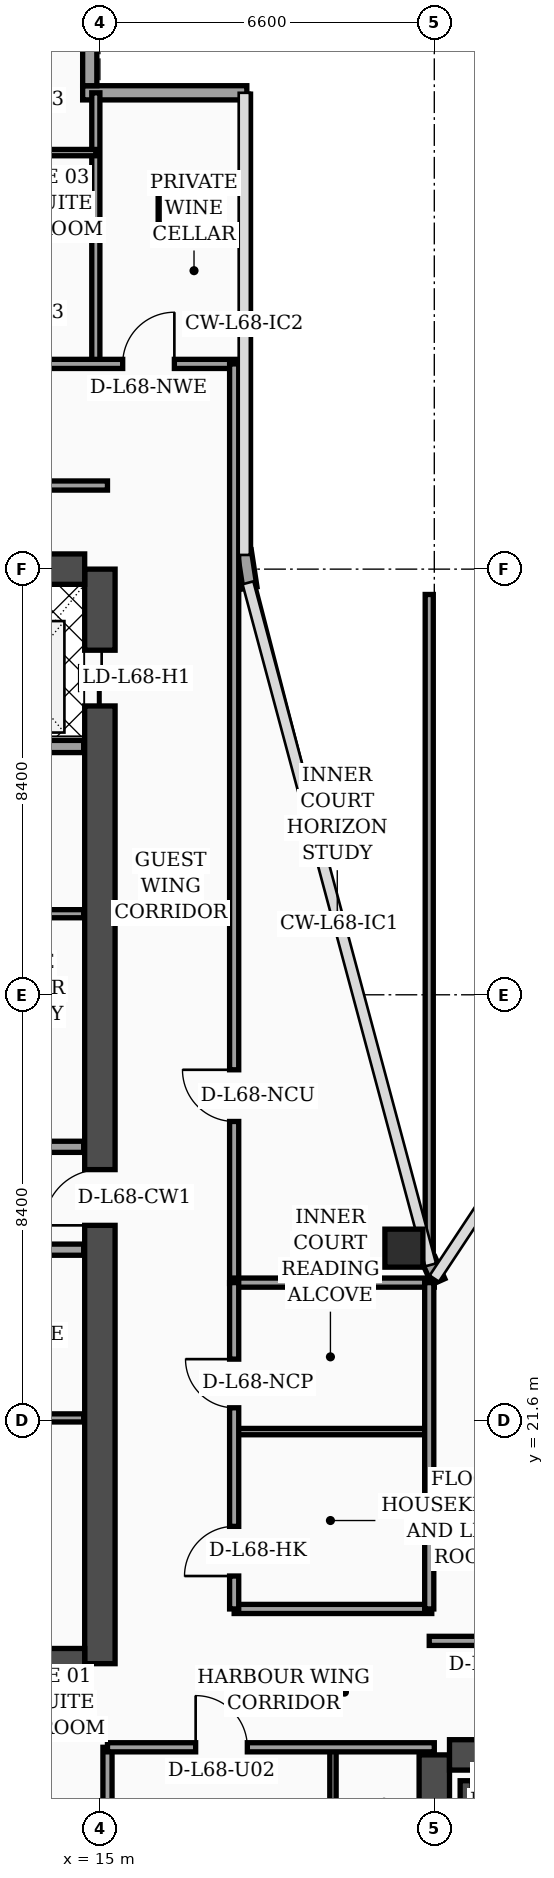
"""IFC4 building model, lengths in metres.
Left out: names, types, materials, properties, quantities, classifications, styles, units other than length and angle.
Written with IfcOpenShell. Run it as: python <this file> out.ifc"""

import sys

from ifc_helpers import new_model, si_unit, direction, frame, frame_2d, origin, origin_2d, place, context, subcontext, project, spatial, rectangle, hollow_rectangle, extrude, element, fill, save


model = new_model("IFC4")
c1 = context("Model", 3, precision=1e-05, world=origin(), true_north=direction((0.0, 1.0)))
c2 = subcontext(c1, "Body", "Model", "MODEL_VIEW")
j1 = project(units=[si_unit("LENGTHUNIT", "METRE"), si_unit("PLANEANGLEUNIT", "RADIAN")], contexts=[c1])
p1 = place(None, origin())
s1 = spatial("IfcSite", under=j1, at=p1, CompositionType="ELEMENT")
p2 = place(p1, origin())
s2 = spatial("IfcBuilding", under=s1, at=p2, CompositionType="ELEMENT")
p3 = place(p2, frame((0.0, 0.0, 274.9)))
s3 = spatial("IfcBuildingStorey", under=s2, at=p3, CompositionType="ELEMENT", Elevation=274.9)
p4 = place(p3, frame((15.0, 16.8, 0.0), z_axis=(0.0, 0.0, 1.0), x_axis=(0.0, 1.0, 0.0)))
e1 = element("IfcWall", 1, at=p4, inside=s3, PredefinedType="SHEAR", context=c2, shape_type="SweptSolid", body=[
    extrude(rectangle(XDim=21.6, YDim=0.6, at=frame_2d((10.8, 0.0))), origin(), (0.0, 0.0, 1.0), 3.56),
])
p5 = place(p4, frame((8.65, 0.0, 0.0)))
e2 = element("IfcOpeningElement", 2, at=p5, cuts=e1, PredefinedType="OPENING", context=c2, shape_type="SweptSolid", body=[
    extrude(rectangle(XDim=1.1, YDim=2.2, at=frame_2d((0.55, 1.1))), frame((0.0, 0.31, 0.0), z_axis=(0.0, -1.0, 0.0), x_axis=(1.0, 0.0, 0.0)), (0.0, 0.0, 1.0), 0.62),
])
p6 = place(p4, frame((18.9, 0.0, 0.0)))
e3 = element("IfcOpeningElement", 3, at=p6, cuts=e1, PredefinedType="OPENING", context=c2, shape_type="SweptSolid", body=[
    extrude(rectangle(XDim=1.1, YDim=2.2, at=frame_2d((0.55, 1.1))), frame((0.0, 0.31, 0.0), z_axis=(0.0, -1.0, 0.0), x_axis=(1.0, 0.0, 0.0)), (0.0, 0.0, 1.0), 0.62),
])
p7 = place(p3, frame((4.5, 38.4, 0.0), z_axis=(0.0, 0.0, 1.0), x_axis=(1.0, 0.0, 0.0)))
e4 = element("IfcWall", 4, at=p7, inside=s3, PredefinedType="SHEAR", context=c2, shape_type="SweptSolid", body=[
    extrude(rectangle(XDim=10.2, YDim=0.6, at=frame_2d((5.1, 0.0))), origin(), (0.0, 0.0, 1.0), 3.56),
])
p8 = place(p7, frame((5.8, 0.0, 0.0)))
e5 = element("IfcOpeningElement", 5, at=p8, cuts=e4, PredefinedType="OPENING", context=c2, shape_type="SweptSolid", body=[
    extrude(rectangle(XDim=1.1, YDim=2.2, at=frame_2d((0.55, 1.1))), frame((0.0, 0.31, 0.0), z_axis=(0.0, -1.0, 0.0), x_axis=(1.0, 0.0, 0.0)), (0.0, 0.0, 1.0), 0.62),
])
p9 = place(p3, frame((4.5, 16.8, 0.0), z_axis=(0.0, 0.0, 1.0), x_axis=(1.0, 0.0, 0.0)))
e6 = element("IfcWall", 6, at=p9, inside=s3, PredefinedType="SHEAR", context=c2, shape_type="SweptSolid", body=[
    extrude(rectangle(XDim=10.2, YDim=0.6, at=frame_2d((5.1, 0.0))), origin(), (0.0, 0.0, 1.0), 3.56),
])
p10 = place(p3, frame((21.6, 4.6, 0.0), z_axis=(0.0, 0.0, 1.0), x_axis=(0.0, 1.0, 0.0)))
e7 = element("IfcWall", 7, at=p10, inside=s3, PredefinedType="SHEAR", context=c2, shape_type="SweptSolid", body=[
    extrude(rectangle(XDim=10.4, YDim=0.6, at=frame_2d((5.2, 0.0))), origin(), (0.0, 0.0, 1.0), 3.56),
])
p11 = place(p3, frame((21.9, 15.0, 0.0), z_axis=(0.0, 0.0, 1.0), x_axis=(1.0, 0.0, 0.0)))
e8 = element("IfcWall", 8, at=p11, inside=s3, PredefinedType="SHEAR", context=c2, shape_type="SweptSolid", body=[
    extrude(rectangle(XDim=10.2, YDim=0.6, at=frame_2d((5.1, 0.0))), origin(), (0.0, 0.0, 1.0), 3.56),
])
p12 = place(p11, frame((5.0, 0.0, 0.0)))
e9 = element("IfcOpeningElement", 9, at=p12, cuts=e8, PredefinedType="OPENING", context=c2, shape_type="SweptSolid", body=[
    extrude(rectangle(XDim=1.1, YDim=2.2, at=frame_2d((0.55, 1.1))), frame((0.0, 0.31, 0.0), z_axis=(0.0, -1.0, 0.0), x_axis=(1.0, 0.0, 0.0)), (0.0, 0.0, 1.0), 0.62),
])
p13 = place(p3, frame((22.23, 4.9, 0.0), z_axis=(0.0, 0.0, 1.0), x_axis=(0.0, 1.0, 0.0)))
e10 = element("IfcWall", 10, at=p13, inside=s3, PredefinedType="SOLIDWALL", context=c2, shape_type="SweptSolid", body=[
    extrude(rectangle(XDim=9.59, YDim=0.24, at=frame_2d((4.795, 0.0))), origin(), (0.0, 0.0, 1.0), 3.56),
])
p14 = place(p3, frame((22.35, 14.37, 0.0), z_axis=(0.0, 0.0, 1.0), x_axis=(1.0, 0.0, 0.0)))
e11 = element("IfcWall", 11, at=p14, inside=s3, PredefinedType="SOLIDWALL", context=c2, shape_type="SweptSolid", body=[
    extrude(rectangle(XDim=3.1, YDim=0.24, at=frame_2d((1.55, 0.0))), origin(), (0.0, 0.0, 1.0), 3.56),
])
p15 = place(p3, frame((16.55, 45.6, 0.0), z_axis=(0.0, 0.0, 1.0), x_axis=(1.0, 0.0, 0.0)))
e12 = element("IfcColumn", 12, at=p15, inside=s3, PredefinedType="COLUMN", context=c2, shape_type="SweptSolid", body=[
    extrude(rectangle(XDim=0.8, YDim=0.8, at=origin_2d()), origin(), (0.0, 0.0, 1.0), 3.56),
])
p16 = place(p3, frame((21.0, 25.0, 0.0), z_axis=(0.0, 0.0, 1.0), x_axis=(1.0, 0.0, 0.0)))
e13 = element("IfcColumn", 13, at=p16, inside=s3, PredefinedType="COLUMN", context=c2, shape_type="SweptSolid", body=[
    extrude(hollow_rectangle(XDim=0.75, YDim=0.75, WallThickness=0.032, at=origin_2d()), origin(), (0.0, 0.0, 1.0), 3.56),
])
p17 = place(p3, frame((21.68, 24.34, 0.0), z_axis=(0.0, 0.0, 1.0), x_axis=(-0.40758134973, 0.913168901875, 0.0)))
e14 = element("IfcWall", 14, at=p17, inside=s3, PredefinedType="SOLIDWALL", context=c2, shape_type="SweptSolid", body=[
    extrude(rectangle(XDim=0.471, YDim=0.28, at=frame_2d((0.235, 0.0))), origin(), (0.0, 0.0, 1.0), 3.56),
])
p18 = place(p3, frame((17.962, 38.03, 0.0), z_axis=(0.0, 0.0, 1.0), x_axis=(-0.15141125477, 0.988470855377, 0.0)))
e15 = element("IfcWall", 15, at=p18, inside=s3, PredefinedType="SOLIDWALL", context=c2, shape_type="SweptSolid", body=[
    extrude(rectangle(XDim=0.739, YDim=0.28, at=frame_2d((0.369, 0.0))), origin(), (0.0, 0.0, 1.0), 3.56),
])
p19 = place(p3, frame((17.9, 47.8, 0.0), z_axis=(0.0, 0.0, 1.0), x_axis=(-1.0, 0.0, 0.0)))
e16 = element("IfcWall", 16, at=p19, inside=s3, PredefinedType="SOLIDWALL", context=c2, shape_type="SweptSolid", body=[
    extrude(rectangle(XDim=3.24, YDim=0.28, at=frame_2d((1.62, 0.0))), origin(), (0.0, 0.0, 1.0), 3.56),
])
p20 = place(p3, frame((14.8, 47.94, 0.0), z_axis=(0.0, 0.0, 1.0), x_axis=(0.0, 1.0, 0.0)))
e17 = element("IfcWall", 17, at=p20, inside=s3, PredefinedType="SOLIDWALL", context=c2, shape_type="SweptSolid", body=[
    extrude(rectangle(XDim=2.94, YDim=0.28, at=frame_2d((1.47, 0.0))), origin(), (0.0, 0.0, 1.0), 3.56),
])
p21 = place(p3, frame((9.68, 21.65, 0.0), z_axis=(0.0, 0.0, 1.0), x_axis=(1.0, 0.0, 0.0)))
e18 = element("IfcWall", 18, at=p21, inside=s3, PredefinedType="PARTITIONING", context=c2, shape_type="SweptSolid", body=[
    extrude(rectangle(XDim=5.0, YDim=0.16, at=frame_2d((2.5, 0.0))), origin(), (0.0, 0.0, 1.0), 3.09),
])
p22 = place(p21, frame((1.1, 0.0, 0.0)))
e19 = element("IfcOpeningElement", 19, at=p22, cuts=e18, PredefinedType="OPENING", context=c2, shape_type="SweptSolid", body=[
    extrude(rectangle(XDim=0.98, YDim=2.15, at=frame_2d((0.49, 1.075))), frame((0.0, 0.09, 0.0), z_axis=(0.0, -1.0, 0.0), x_axis=(1.0, 0.0, 0.0)), (0.0, 0.0, 1.0), 0.18),
])
p23 = place(p3, frame((9.68, 24.97, 0.0), z_axis=(0.0, 0.0, 1.0), x_axis=(1.0, 0.0, 0.0)))
e20 = element("IfcWall", 20, at=p23, inside=s3, PredefinedType="SOLIDWALL", context=c2, shape_type="SweptSolid", body=[
    extrude(rectangle(XDim=5.0, YDim=0.22, at=frame_2d((2.5, 0.0))), origin(), (0.0, 0.0, 1.0), 2.99),
])
p24 = place(p23, frame((0.9, 0.0, 0.0)))
e21 = element("IfcOpeningElement", 21, at=p24, cuts=e20, PredefinedType="OPENING", context=c2, shape_type="SweptSolid", body=[
    extrude(rectangle(XDim=0.98, YDim=2.15, at=frame_2d((0.49, 1.075))), frame((0.0, 0.12, 0.0), z_axis=(0.0, -1.0, 0.0), x_axis=(1.0, 0.0, 0.0)), (0.0, 0.0, 1.0), 0.24),
])
p25 = place(p3, frame((12.25, 27.0, 0.0), z_axis=(0.0, 0.0, 1.0), x_axis=(1.0, 0.0, 0.0)))
e22 = element("IfcWall", 22, at=p25, inside=s3, PredefinedType="SOLIDWALL", context=c2, shape_type="SweptSolid", body=[
    extrude(rectangle(XDim=2.43, YDim=0.22, at=frame_2d((1.215, 0.0))), origin(), (0.0, 0.0, 1.0), 3.56),
])
p26 = place(p3, frame((12.25, 31.6, 0.0), z_axis=(0.0, 0.0, 1.0), x_axis=(1.0, 0.0, 0.0)))
e23 = element("IfcWall", 23, at=p26, inside=s3, PredefinedType="PARTITIONING", context=c2, shape_type="SweptSolid", body=[
    extrude(rectangle(XDim=2.43, YDim=0.16, at=frame_2d((1.215, 0.0))), origin(), (0.0, 0.0, 1.0), 3.14),
])
p27 = place(p26, frame((0.55, 0.0, 0.0)))
e24 = element("IfcOpeningElement", 24, at=p27, cuts=e23, PredefinedType="OPENING", context=c2, shape_type="SweptSolid", body=[
    extrude(rectangle(XDim=0.98, YDim=2.15, at=frame_2d((0.49, 1.075))), frame((0.0, 0.09, 0.0), z_axis=(0.0, -1.0, 0.0), x_axis=(1.0, 0.0, 0.0)), (0.0, 0.0, 1.0), 0.18),
])
p28 = place(p3, frame((9.66, 34.9, 0.0), z_axis=(0.0, 0.0, 1.0), x_axis=(1.0, 0.0, 0.0)))
e25 = element("IfcWall", 25, at=p28, inside=s3, PredefinedType="SOLIDWALL", context=c2, shape_type="SweptSolid", body=[
    extrude(rectangle(XDim=5.02, YDim=0.24, at=frame_2d((2.51, 0.0))), origin(), (0.0, 0.0, 1.0), 3.56),
])
p29 = place(p3, frame((15.15, 2.44, 0.0), z_axis=(0.0, 0.0, 1.0), x_axis=(0.0, 1.0, 0.0)))
e26 = element("IfcWall", 26, at=p29, inside=s3, PredefinedType="PARTITIONING", context=c2, shape_type="SweptSolid", body=[
    extrude(rectangle(XDim=12.71, YDim=0.18, at=frame_2d((6.355, 0.0))), origin(), (0.0, 0.0, 1.0), 3.09),
])
p30 = place(p3, frame((19.6, 2.44, 0.0), z_axis=(0.0, 0.0, 1.0), x_axis=(0.0, 1.0, 0.0)))
e27 = element("IfcWall", 27, at=p30, inside=s3, PredefinedType="PARTITIONING", context=c2, shape_type="SweptSolid", body=[
    extrude(rectangle(XDim=12.71, YDim=0.125, at=frame_2d((6.355, 0.0))), origin(), (0.0, 0.0, 1.0), 2.59),
])
p31 = place(p30, frame((4.34, 0.0, 0.0)))
e28 = element("IfcOpeningElement", 28, at=p31, cuts=e27, PredefinedType="OPENING", context=c2, shape_type="SweptSolid", body=[
    extrude(rectangle(XDim=0.96, YDim=2.2, at=frame_2d((0.48, 1.1))), frame((0.0, 0.073, 0.0), z_axis=(0.0, -1.0, 0.0), x_axis=(1.0, 0.0, 0.0)), (0.0, 0.0, 1.0), 0.145),
])
p32 = place(p30, frame((10.18, 0.0, 0.0)))
e29 = element("IfcOpeningElement", 29, at=p32, cuts=e27, PredefinedType="OPENING", context=c2, shape_type="SweptSolid", body=[
    extrude(rectangle(XDim=0.9, YDim=2.15, at=frame_2d((0.45, 1.075))), frame((0.0, 0.073, 0.0), z_axis=(0.0, -1.0, 0.0), x_axis=(1.0, 0.0, 0.0)), (0.0, 0.0, 1.0), 0.145),
])
p33 = place(p3, frame((15.15, 15.15, 0.0), z_axis=(0.0, 0.0, 1.0), x_axis=(1.0, 0.0, 0.0)))
e30 = element("IfcWall", 30, at=p33, inside=s3, PredefinedType="PARTITIONING", context=c2, shape_type="SweptSolid", body=[
    extrude(rectangle(XDim=6.45, YDim=0.18, at=frame_2d((3.225, 0.0))), origin(), (0.0, 0.0, 1.0), 2.59),
])
p34 = place(p33, frame((1.74, 0.0, 0.0)))
e31 = element("IfcOpeningElement", 31, at=p34, cuts=e30, PredefinedType="OPENING", context=c2, shape_type="SweptSolid", body=[
    extrude(rectangle(XDim=1.02, YDim=2.2, at=frame_2d((0.51, 1.1))), frame((0.0, 0.1, 0.0), z_axis=(0.0, -1.0, 0.0), x_axis=(1.0, 0.0, 0.0)), (0.0, 0.0, 1.0), 0.2),
])
p35 = place(p3, frame((14.92, 42.45, 0.0), z_axis=(0.0, 0.0, 1.0), x_axis=(0.0, 1.0, 0.0)))
e32 = element("IfcWall", 32, at=p35, inside=s3, PredefinedType="PARTITIONING", context=c2, shape_type="SweptSolid", body=[
    extrude(rectangle(XDim=5.35, YDim=0.16, at=frame_2d((2.675, 0.0))), origin(), (0.0, 0.0, 1.0), 3.09),
])
p36 = place(p3, frame((12.79, 46.62, 0.0), z_axis=(0.0, 0.0, 1.0), x_axis=(1.0, 0.0, 0.0)))
e33 = element("IfcWall", 33, at=p36, inside=s3, PredefinedType="PARTITIONING", context=c2, shape_type="SweptSolid", body=[
    extrude(rectangle(XDim=2.13, YDim=0.125, at=frame_2d((1.065, 0.0))), origin(), (0.0, 0.0, 1.0), 3.09),
])
p37 = place(p3, frame((0.08, 42.45, 0.0), z_axis=(0.0, 0.0, 1.0), x_axis=(1.0, 0.0, 0.0)))
e34 = element("IfcWall", 34, at=p37, inside=s3, PredefinedType="PARTITIONING", context=c2, shape_type="SweptSolid", body=[
    extrude(rectangle(XDim=17.77, YDim=0.18, at=frame_2d((8.885, 0.0))), origin(), (0.0, 0.0, 1.0), 2.99),
])
p38 = place(p37, frame((0.9, 0.0, 0.0)))
e35 = element("IfcOpeningElement", 35, at=p38, cuts=e34, PredefinedType="OPENING", context=c2, shape_type="SweptSolid", body=[
    extrude(rectangle(XDim=1.02, YDim=2.2, at=frame_2d((0.51, 1.1))), frame((0.0, 0.1, 0.0), z_axis=(0.0, -1.0, 0.0), x_axis=(1.0, 0.0, 0.0)), (0.0, 0.0, 1.0), 0.2),
])
p39 = place(p37, frame((7.38, 0.0, 0.0)))
e36 = element("IfcOpeningElement", 36, at=p39, cuts=e34, PredefinedType="OPENING", context=c2, shape_type="SweptSolid", body=[
    extrude(rectangle(XDim=1.02, YDim=2.2, at=frame_2d((0.51, 1.1))), frame((0.0, 0.1, 0.0), z_axis=(0.0, -1.0, 0.0), x_axis=(1.0, 0.0, 0.0)), (0.0, 0.0, 1.0), 0.2),
])
p40 = place(p37, frame((15.37, 0.0, 0.0)))
e37 = element("IfcOpeningElement", 37, at=p40, cuts=e34, PredefinedType="OPENING", context=c2, shape_type="SweptSolid", body=[
    extrude(rectangle(XDim=1.02, YDim=2.2, at=frame_2d((0.51, 1.1))), frame((0.0, 0.1, 0.0), z_axis=(0.0, -1.0, 0.0), x_axis=(1.0, 0.0, 0.0)), (0.0, 0.0, 1.0), 0.2),
])
p41 = place(p3, frame((17.65, 24.3, 0.0), z_axis=(0.0, 0.0, 1.0), x_axis=(0.0, 1.0, 0.0)))
e38 = element("IfcWall", 38, at=p41, inside=s3, PredefinedType="PARTITIONING", context=c2, shape_type="SweptSolid", body=[
    extrude(rectangle(XDim=18.15, YDim=0.18, at=frame_2d((9.075, 0.0))), origin(), (0.0, 0.0, 1.0), 2.99),
])
p42 = place(p41, frame((3.2, 0.0, 0.0)))
e39 = element("IfcOpeningElement", 39, at=p42, cuts=e38, PredefinedType="OPENING", context=c2, shape_type="SweptSolid", body=[
    extrude(rectangle(XDim=1.02, YDim=2.2, at=frame_2d((0.51, 1.1))), frame((0.0, 0.1, 0.0), z_axis=(0.0, -1.0, 0.0), x_axis=(1.0, 0.0, 0.0)), (0.0, 0.0, 1.0), 0.2),
])
p43 = place(p3, frame((3.88, 40.05, 0.0), z_axis=(0.0, 0.0, 1.0), x_axis=(1.0, 0.0, 0.0)))
e40 = element("IfcWall", 40, at=p43, inside=s3, PredefinedType="PARTITIONING", context=c2, shape_type="SweptSolid", body=[
    extrude(rectangle(XDim=11.27, YDim=0.18, at=frame_2d((5.635, 0.0))), origin(), (0.0, 0.0, 1.0), 2.99),
])
p44 = place(p3, frame((17.65, 17.88, 0.0), z_axis=(0.0, 0.0, 1.0), x_axis=(1.0, 0.0, 0.0)))
e41 = element("IfcWall", 41, at=p44, inside=s3, PredefinedType="PARTITIONING", context=c2, shape_type="SweptSolid", body=[
    extrude(rectangle(XDim=3.9, YDim=0.18, at=frame_2d((1.95, 0.0))), origin(), (0.0, 0.0, 1.0), 3.56),
])
p45 = place(p3, frame((17.65, 21.38, 0.0), z_axis=(0.0, 0.0, 1.0), x_axis=(1.0, 0.0, 0.0)))
e42 = element("IfcWall", 42, at=p45, inside=s3, PredefinedType="PARTITIONING", context=c2, shape_type="SweptSolid", body=[
    extrude(rectangle(XDim=3.9, YDim=0.125, at=frame_2d((1.95, 0.0))), origin(), (0.0, 0.0, 1.0), 3.09),
])
p46 = place(p3, frame((17.65, 24.32, 0.0), z_axis=(0.0, 0.0, 1.0), x_axis=(1.0, 0.0, 0.0)))
e43 = element("IfcWall", 43, at=p46, inside=s3, PredefinedType="PARTITIONING", context=c2, shape_type="SweptSolid", body=[
    extrude(rectangle(XDim=3.95, YDim=0.18, at=frame_2d((1.975, 0.0))), origin(), (0.0, 0.0, 1.0), 3.56),
])
p47 = place(p3, frame((21.5, 17.88, 0.0), z_axis=(0.0, 0.0, 1.0), x_axis=(0.0, 1.0, 0.0)))
e44 = element("IfcWall", 44, at=p47, inside=s3, PredefinedType="PARTITIONING", context=c2, shape_type="SweptSolid", body=[
    extrude(rectangle(XDim=6.44, YDim=0.18, at=frame_2d((3.22, 0.0))), origin(), (0.0, 0.0, 1.0), 3.09),
])
p48 = place(p3, frame((17.65, 17.88, 0.0), z_axis=(0.0, 0.0, 1.0), x_axis=(0.0, 1.0, 0.0)))
e45 = element("IfcWall", 45, at=p48, inside=s3, PredefinedType="PARTITIONING", context=c2, shape_type="SweptSolid", body=[
    extrude(rectangle(XDim=6.44, YDim=0.18, at=frame_2d((3.22, 0.0))), origin(), (0.0, 0.0, 1.0), 3.09),
])
p49 = place(p48, frame((0.65, 0.0, 0.0)))
e46 = element("IfcOpeningElement", 46, at=p49, cuts=e45, PredefinedType="OPENING", context=c2, shape_type="SweptSolid", body=[
    extrude(rectangle(XDim=0.98, YDim=2.15, at=frame_2d((0.49, 1.075))), frame((0.0, 0.1, 0.0), z_axis=(0.0, -1.0, 0.0), x_axis=(1.0, 0.0, 0.0)), (0.0, 0.0, 1.0), 0.2),
])
p50 = place(p48, frame((3.97, 0.0, 0.0)))
e47 = element("IfcOpeningElement", 47, at=p50, cuts=e45, PredefinedType="OPENING", context=c2, shape_type="SweptSolid", body=[
    extrude(rectangle(XDim=0.96, YDim=2.2, at=frame_2d((0.48, 1.1))), frame((0.0, 0.1, 0.0), z_axis=(0.0, -1.0, 0.0), x_axis=(1.0, 0.0, 0.0)), (0.0, 0.0, 1.0), 0.2),
])
p51 = place(p3, frame((21.5, 24.85, 0.0), z_axis=(0.0, 0.0, 1.0), x_axis=(0.0, 1.0, 0.0)))
e48 = element("IfcWall", 48, at=p51, inside=s3, PredefinedType="PARTITIONING", context=c2, shape_type="SweptSolid", body=[
    extrude(rectangle(XDim=13.05, YDim=0.16, at=frame_2d((6.525, 0.0))), origin(), (0.0, 0.0, 1.0), 2.99),
])
p52 = place(p3, frame((21.5, 17.25, 0.0), z_axis=(0.0, 0.0, 1.0), x_axis=(1.0, 0.0, 0.0)))
e49 = element("IfcWall", 49, at=p52, inside=s3, PredefinedType="PARTITIONING", context=c2, shape_type="SweptSolid", body=[
    extrude(rectangle(XDim=6.9, YDim=0.18, at=frame_2d((3.45, 0.0))), origin(), (0.0, 0.0, 1.0), 3.56),
])
p53 = place(p52, frame((0.95, 0.0, 0.0)))
e50 = element("IfcOpeningElement", 50, at=p53, cuts=e49, PredefinedType="OPENING", context=c2, shape_type="SweptSolid", body=[
    extrude(rectangle(XDim=1.02, YDim=2.2, at=frame_2d((0.51, 1.1))), frame((0.0, 0.1, 0.0), z_axis=(0.0, -1.0, 0.0), x_axis=(1.0, 0.0, 0.0)), (0.0, 0.0, 1.0), 0.2),
])
p54 = place(p34, origin())
e51 = element("IfcDoor", 51, at=p54, inside=s3, OperationType="SINGLE_SWING_LEFT", PredefinedType="DOOR", context=c2, shape_type="SweptSolid", body=[
    extrude(rectangle(XDim=1.02, YDim=2.2, at=frame_2d((0.51, 1.1))), frame((0.0, 0.025, 0.0), z_axis=(0.0, -1.0, 0.0), x_axis=(1.0, 0.0, 0.0)), (0.0, 0.0, 1.0), 0.05),
])
fill(e31, e51)
p55 = place(p40, origin())
e52 = element("IfcDoor", 52, at=p55, inside=s3, OperationType="SINGLE_SWING_RIGHT", PredefinedType="DOOR", context=c2, shape_type="SweptSolid", body=[
    extrude(rectangle(XDim=1.02, YDim=2.2, at=frame_2d((0.51, 1.1))), frame((0.0, 0.025, 0.0), z_axis=(0.0, -1.0, 0.0), x_axis=(1.0, 0.0, 0.0)), (0.0, 0.0, 1.0), 0.05),
])
fill(e37, e52)
p56 = place(p42, origin())
e53 = element("IfcDoor", 53, at=p56, inside=s3, OperationType="SINGLE_SWING_RIGHT", PredefinedType="DOOR", context=c2, shape_type="SweptSolid", body=[
    extrude(rectangle(XDim=1.02, YDim=2.2, at=frame_2d((0.51, 1.1))), frame((0.0, 0.025, 0.0), z_axis=(0.0, -1.0, 0.0), x_axis=(1.0, 0.0, 0.0)), (0.0, 0.0, 1.0), 0.05),
])
fill(e39, e53)
p57 = place(p49, origin())
e54 = element("IfcDoor", 54, at=p57, inside=s3, OperationType="SINGLE_SWING_LEFT", PredefinedType="DOOR", context=c2, shape_type="SweptSolid", body=[
    extrude(rectangle(XDim=0.98, YDim=2.15, at=frame_2d((0.49, 1.075))), frame((0.0, 0.025, 0.0), z_axis=(0.0, -1.0, 0.0), x_axis=(1.0, 0.0, 0.0)), (0.0, 0.0, 1.0), 0.05),
])
fill(e46, e54)
p58 = place(p50, origin())
e55 = element("IfcDoor", 55, at=p58, inside=s3, OperationType="SINGLE_SWING_RIGHT", PredefinedType="DOOR", context=c2, shape_type="SweptSolid", body=[
    extrude(rectangle(XDim=0.96, YDim=2.2, at=frame_2d((0.48, 1.1))), frame((0.0, 0.025, 0.0), z_axis=(0.0, -1.0, 0.0), x_axis=(1.0, 0.0, 0.0)), (0.0, 0.0, 1.0), 0.05),
])
fill(e47, e55)
p59 = place(p5, origin())
e56 = element("IfcDoor", 56, at=p59, inside=s3, OperationType="SINGLE_SWING_LEFT", PredefinedType="DOOR", context=c2, shape_type="SweptSolid", body=[
    extrude(rectangle(XDim=1.1, YDim=2.2, at=frame_2d((0.55, 1.1))), frame((0.0, 0.025, 0.0), z_axis=(0.0, -1.0, 0.0), x_axis=(1.0, 0.0, 0.0)), (0.0, 0.0, 1.0), 0.05),
])
fill(e2, e56)
p60 = place(p6, origin())
e57 = element("IfcDoor", 57, at=p60, inside=s3, OperationType="DOUBLE_DOOR_SLIDING", PredefinedType="DOOR", context=c2, shape_type="SweptSolid", body=[
    extrude(rectangle(XDim=1.1, YDim=2.2, at=frame_2d((0.55, 1.1))), frame((0.0, 0.025, 0.0), z_axis=(0.0, -1.0, 0.0), x_axis=(1.0, 0.0, 0.0)), (0.0, 0.0, 1.0), 0.05),
])
fill(e3, e57)
save(model, sys.argv[1])
